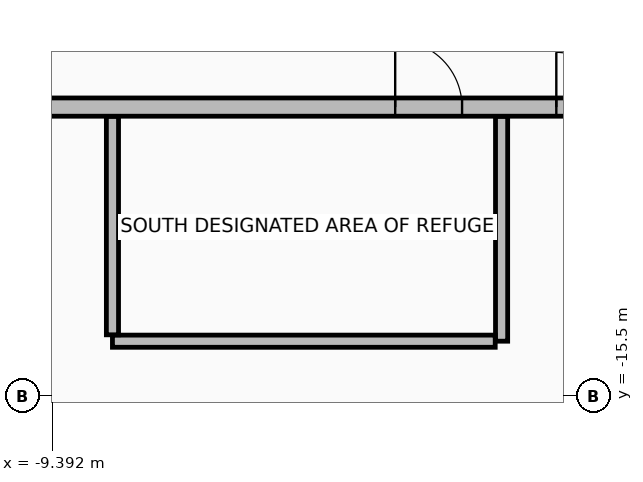
"""IFC4 building model, lengths in metres.
Left out: names, types, materials, properties, quantities, classifications, styles, units other than length and angle.
Written with IfcOpenShell. Run it as: python <this file> out.ifc"""

import sys

from ifc_helpers import new_model, si_unit, direction, frame, frame_2d, origin, place, context, subcontext, project, spatial, rectangle, extrude, element, fill, save


model = new_model("IFC4")
c1 = context("Model", 3, precision=1e-05, world=origin(), true_north=direction((0.0, 1.0)))
c2 = subcontext(c1, "Body", "Model", "MODEL_VIEW")
j1 = project(units=[si_unit("LENGTHUNIT", "METRE"), si_unit("PLANEANGLEUNIT", "RADIAN")], contexts=[c1])
p1 = place(None, origin())
s1 = spatial("IfcSite", under=j1, at=p1, CompositionType="ELEMENT")
p2 = place(p1, origin())
s2 = spatial("IfcBuilding", under=s1, at=p2, CompositionType="ELEMENT")
p3 = place(p2, frame((0.0, 0.0, 222.05)))
s3 = spatial("IfcBuildingStorey", under=s2, at=p3, CompositionType="ELEMENT", Elevation=222.05)
p4 = place(p3, frame((-12.05, -10.75, 0.0), z_axis=(0.0, 0.0, 1.0), x_axis=(1.0, 0.0, 0.0)))
e1 = element("IfcWall", 1, at=p4, inside=s3, PredefinedType="STANDARD", context=c2, shape_type="SweptSolid", body=[
    extrude(rectangle(XDim=24.1, YDim=0.3, at=frame_2d((12.05, 0.0))), origin(), (0.0, 0.0, 1.0), 2.605),
])
p5 = place(p4, frame((10.95, 0.0, 0.0)))
e2 = element("IfcOpeningElement", 2, at=p5, cuts=e1, PredefinedType="OPENING", context=c2, shape_type="SweptSolid", body=[
    extrude(rectangle(XDim=1.8, YDim=2.3, at=frame_2d((0.9, 1.15))), frame((0.0, 0.16, 0.0), z_axis=(0.0, -1.0, 0.0), x_axis=(1.0, 0.0, 0.0)), (0.0, 0.0, 1.0), 0.32),
])
p6 = place(p4, frame((8.3, 0.0, 0.0)))
e3 = element("IfcOpeningElement", 3, at=p6, cuts=e1, PredefinedType="OPENING", context=c2, shape_type="SweptSolid", body=[
    extrude(rectangle(XDim=1.1, YDim=2.15, at=frame_2d((0.55, 1.075))), frame((0.0, 0.16, 0.0), z_axis=(0.0, -1.0, 0.0), x_axis=(1.0, 0.0, 0.0)), (0.0, 0.0, 1.0), 0.32),
])
p7 = place(p4, frame((16.477, 0.0, 0.0)))
e4 = element("IfcOpeningElement", 4, at=p7, cuts=e1, PredefinedType="OPENING", context=c2, shape_type="SweptSolid", body=[
    extrude(rectangle(XDim=0.9, YDim=2.1, at=frame_2d((0.45, 1.05))), frame((0.0, 0.16, 0.0), z_axis=(0.0, -1.0, 0.0), x_axis=(1.0, 0.0, 0.0)), (0.0, 0.0, 1.0), 0.32),
])
p8 = place(p3, frame((-2.0, -10.905, 0.0), z_axis=(0.0, 0.0, 1.0), x_axis=(0.0, -1.0, 0.0)))
e5 = element("IfcWall", 5, at=p8, inside=s3, PredefinedType="PARTITIONING", context=c2, shape_type="SweptSolid", body=[
    extrude(rectangle(XDim=3.695, YDim=0.2, at=frame_2d((1.848, 0.0))), origin(), (0.0, 0.0, 1.0), 4.81),
])
p9 = place(p3, frame((-2.105, -14.6, 0.0), z_axis=(0.0, 0.0, 1.0), x_axis=(-1.0, 0.0, 0.0)))
e6 = element("IfcWall", 6, at=p9, inside=s3, PredefinedType="PARTITIONING", context=c2, shape_type="SweptSolid", body=[
    extrude(rectangle(XDim=6.295, YDim=0.2, at=frame_2d((3.147, 0.0))), origin(), (0.0, 0.0, 1.0), 2.605),
])
p10 = place(p3, frame((-8.4, -14.495, 0.0), z_axis=(0.0, 0.0, 1.0), x_axis=(0.0, 1.0, 0.0)))
e7 = element("IfcWall", 7, at=p10, inside=s3, PredefinedType="PARTITIONING", context=c2, shape_type="SweptSolid", body=[
    extrude(rectangle(XDim=3.59, YDim=0.2, at=frame_2d((1.795, 0.0))), origin(), (0.0, 0.0, 1.0), 4.81),
])
p11 = place(p5, frame((1.8, 0.0, 0.0), z_axis=(0.0, 0.0, 1.0), x_axis=(-1.0, 0.0, 0.0)))
e8 = element("IfcDoor", 8, at=p11, inside=s3, OperationType="DOUBLE_DOOR_SINGLE_SWING", PredefinedType="DOOR", context=c2, shape_type="SweptSolid", body=[
    extrude(rectangle(XDim=1.8, YDim=2.3, at=frame_2d((0.9, 1.15))), frame((0.0, 0.025, 0.0), z_axis=(0.0, -1.0, 0.0), x_axis=(1.0, 0.0, 0.0)), (0.0, 0.0, 1.0), 0.05),
])
fill(e2, e8)
p12 = place(p6, origin())
e9 = element("IfcDoor", 9, at=p12, inside=s3, OperationType="SINGLE_SWING_LEFT", PredefinedType="DOOR", context=c2, shape_type="SweptSolid", body=[
    extrude(rectangle(XDim=1.1, YDim=2.15, at=frame_2d((0.55, 1.075))), frame((0.0, 0.025, 0.0), z_axis=(0.0, -1.0, 0.0), x_axis=(1.0, 0.0, 0.0)), (0.0, 0.0, 1.0), 0.05),
])
fill(e3, e9)
save(model, sys.argv[1])
